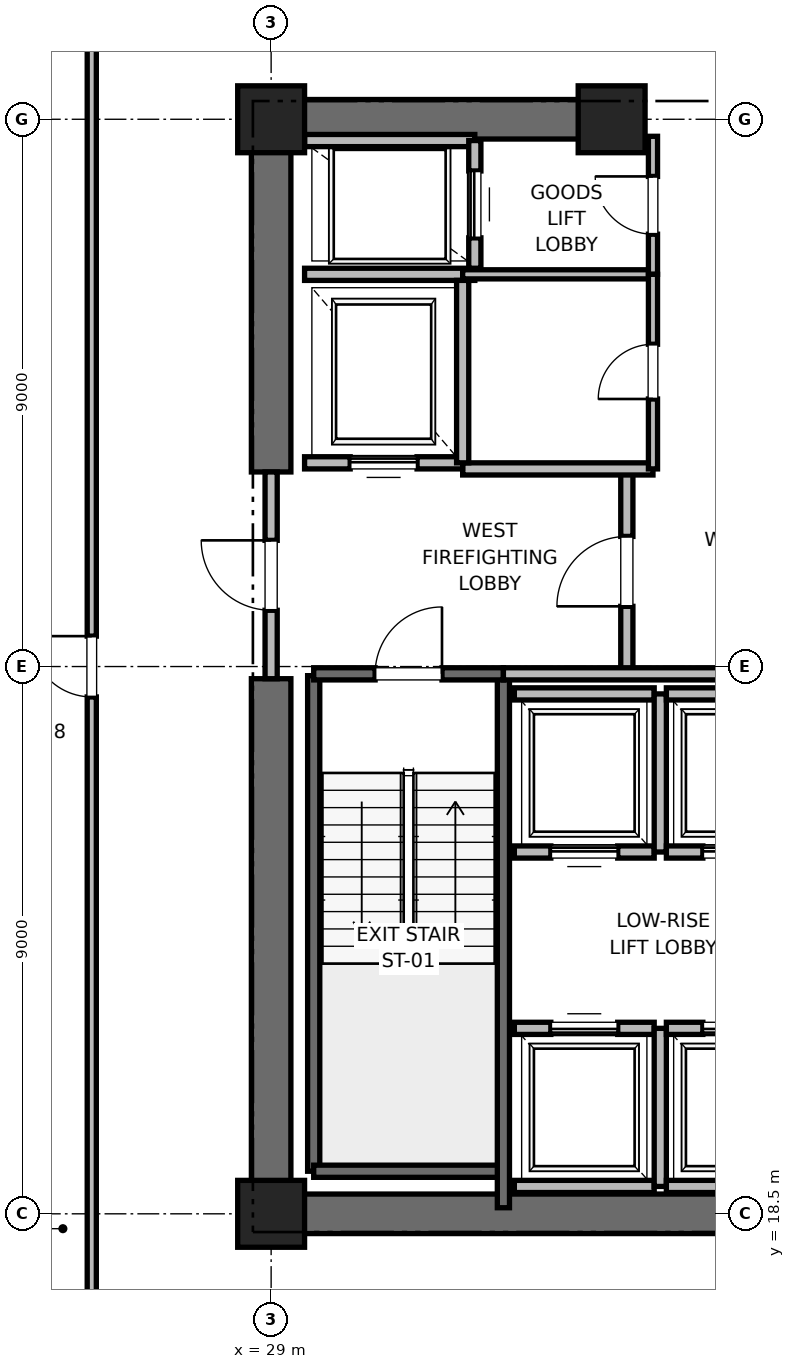
"""IFC4 building model, lengths in metres.
Left out: names, types, materials, properties, quantities, classifications, styles, units other than length and angle.
Written with IfcOpenShell. Run it as: python <this file> out.ifc"""

import sys

from ifc_helpers import new_model, si_unit, direction, frame, frame_2d, origin, origin_2d, place, context, subcontext, project, spatial, rectangle, extrude, element, fill, save


model = new_model("IFC4")
c1 = context("Model", 3, precision=1e-05, world=origin(), true_north=direction((0.0, 1.0)))
c2 = subcontext(c1, "Body", "Model", "MODEL_VIEW")
j1 = project(units=[si_unit("LENGTHUNIT", "METRE"), si_unit("PLANEANGLEUNIT", "RADIAN")], contexts=[c1])
p1 = place(None, origin())
s1 = spatial("IfcSite", under=j1, at=p1, CompositionType="ELEMENT")
p2 = place(p1, origin())
s2 = spatial("IfcBuilding", under=s1, at=p2, CompositionType="ELEMENT")
p3 = place(p2, frame((0.0, 0.0, 35.6)))
s3 = spatial("IfcBuildingStorey", under=s2, at=p3, CompositionType="ELEMENT", Elevation=35.6)
for number, where, z_axis, x_axis in (
    (1, (29.0, 18.5, 0.0), (0.0, 0.0, 1.0), (1.0, 0.0, 0.0)),
    (2, (29.0, 36.5, 0.0), (0.0, 0.0, 1.0), (1.0, 0.0, 0.0)),
    (3, (34.6, 36.5, 0.0), (0.0, 0.0, 1.0), (1.0, 0.0, 0.0)),
):
    element("IfcColumn", number, at=place(p3, frame(where, z_axis=z_axis, x_axis=x_axis)), inside=s3, PredefinedType="PILASTER", context=c2, shape_type="SweptSolid", body=[
        extrude(rectangle(XDim=1.1, YDim=1.1, at=origin_2d()), origin(), (0.0, 0.0, 1.0), 4.0),
    ])
p4 = place(p3, frame((29.0, 18.5, 0.0), z_axis=(0.0, 0.0, 1.0), x_axis=(1.0, 0.0, 0.0)))
e4 = element("IfcWall", 4, at=p4, inside=s3, PredefinedType="SHEAR", context=c2, shape_type="SweptSolid", body=[
    extrude(rectangle(XDim=9.2, YDim=0.65, at=frame_2d((4.6, 0.0))), origin(), (0.0, 0.0, 1.0), 3.76),
])
p5 = place(p3, frame((29.0, 36.5, 0.0), z_axis=(0.0, 0.0, 1.0), x_axis=(1.0, 0.0, 0.0)))
e5 = element("IfcWall", 5, at=p5, inside=s3, PredefinedType="SHEAR", context=c2, shape_type="SweptSolid", body=[
    extrude(rectangle(XDim=5.8, YDim=0.65, at=frame_2d((2.9, 0.0))), origin(), (0.0, 0.0, 1.0), 3.76),
])
p6 = place(p3, frame((29.0, 18.5, 0.0), z_axis=(0.0, 0.0, 1.0), x_axis=(0.0, 1.0, 0.0)))
e6 = element("IfcWall", 6, at=p6, inside=s3, PredefinedType="SHEAR", context=c2, shape_type="SweptSolid", body=[
    extrude(rectangle(XDim=8.8, YDim=0.65, at=frame_2d((4.4, 0.0))), origin(), (0.0, 0.0, 1.0), 3.76),
])
p7 = place(p3, frame((29.0, 30.7, 0.0), z_axis=(0.0, 0.0, 1.0), x_axis=(0.0, 1.0, 0.0)))
e7 = element("IfcWall", 7, at=p7, inside=s3, PredefinedType="SHEAR", context=c2, shape_type="SweptSolid", body=[
    extrude(rectangle(XDim=5.8, YDim=0.65, at=frame_2d((2.9, 0.0))), origin(), (0.0, 0.0, 1.0), 3.76),
])
p8 = place(p3, frame((29.7, 19.2, 0.0), z_axis=(0.0, 0.0, 1.0), x_axis=(0.0, 1.0, 0.0)))
e8 = element("IfcWall", 8, at=p8, inside=s3, PredefinedType="SOLIDWALL", context=c2, shape_type="SweptSolid", body=[
    extrude(rectangle(XDim=8.15, YDim=0.2, at=frame_2d((4.075, 0.0))), origin(), (0.0, 0.0, 1.0), 3.76),
])
p9 = place(p3, frame((29.7, 19.2, 0.0), z_axis=(0.0, 0.0, 1.0), x_axis=(1.0, 0.0, 0.0)))
e9 = element("IfcWall", 9, at=p9, inside=s3, PredefinedType="SOLIDWALL", context=c2, shape_type="SweptSolid", body=[
    extrude(rectangle(XDim=3.12, YDim=0.2, at=frame_2d((1.56, 0.0))), origin(), (0.0, 0.0, 1.0), 3.76),
])
p10 = place(p3, frame((32.82, 18.6, 0.0), z_axis=(0.0, 0.0, 1.0), x_axis=(0.0, 1.0, 0.0)))
e10 = element("IfcWall", 10, at=p10, inside=s3, PredefinedType="SOLIDWALL", context=c2, shape_type="SweptSolid", body=[
    extrude(rectangle(XDim=8.78, YDim=0.2, at=frame_2d((4.39, 0.0))), origin(), (0.0, 0.0, 1.0), 3.76),
])
p11 = place(p3, frame((29.7, 27.38, 0.0), z_axis=(0.0, 0.0, 1.0), x_axis=(1.0, 0.0, 0.0)))
e11 = element("IfcWall", 11, at=p11, inside=s3, PredefinedType="SOLIDWALL", context=c2, shape_type="SweptSolid", body=[
    extrude(rectangle(XDim=3.12, YDim=0.2, at=frame_2d((1.56, 0.0))), origin(), (0.0, 0.0, 1.0), 3.76),
])
p12 = place(p11, frame((1.01, 0.0, 0.0)))
e12 = element("IfcOpeningElement", 12, at=p12, cuts=e11, PredefinedType="OPENING", context=c2, shape_type="SweptSolid", body=[
    extrude(rectangle(XDim=1.1, YDim=2.15, at=frame_2d((0.55, 1.075))), frame((0.0, 0.1, 0.0), z_axis=(0.0, -1.0, 0.0), x_axis=(1.0, 0.0, 0.0)), (0.0, 0.0, 1.0), 0.2),
])
p13 = place(p3, frame((34.85, 27.38, 0.0), z_axis=(0.0, 0.0, 1.0), x_axis=(0.0, 1.0, 0.0)))
e13 = element("IfcWall", 13, at=p13, inside=s3, PredefinedType="PARTITIONING", context=c2, shape_type="SweptSolid", body=[
    extrude(rectangle(XDim=3.37, YDim=0.2, at=frame_2d((1.685, 0.0))), origin(), (0.0, 0.0, 1.0), 3.76),
])
p14 = place(p13, frame((1.11, 0.0, 0.0)))
e14 = element("IfcOpeningElement", 14, at=p14, cuts=e13, PredefinedType="OPENING", context=c2, shape_type="SweptSolid", body=[
    extrude(rectangle(XDim=1.15, YDim=2.2, at=frame_2d((0.575, 1.1))), frame((0.0, 0.1, 0.0), z_axis=(0.0, -1.0, 0.0), x_axis=(1.0, 0.0, 0.0)), (0.0, 0.0, 1.0), 0.2),
])
p15 = place(p3, frame((29.0, 27.3, 0.0), z_axis=(0.0, 0.0, 1.0), x_axis=(0.0, 1.0, 0.0)))
e15 = element("IfcWall", 15, at=p15, inside=s3, PredefinedType="PARTITIONING", context=c2, shape_type="SweptSolid", body=[
    extrude(rectangle(XDim=3.4, YDim=0.2, at=frame_2d((1.7, 0.0))), origin(), (0.0, 0.0, 1.0), 2.54),
])
p16 = place(p15, frame((1.125, 0.0, 0.0)))
e16 = element("IfcOpeningElement", 16, at=p16, cuts=e15, PredefinedType="OPENING", context=c2, shape_type="SweptSolid", body=[
    extrude(rectangle(XDim=1.15, YDim=2.2, at=frame_2d((0.575, 1.1))), frame((0.0, 0.1, 0.0), z_axis=(0.0, -1.0, 0.0), x_axis=(1.0, 0.0, 0.0)), (0.0, 0.0, 1.0), 0.2),
])
p17 = place(p3, frame((32.82, 27.38, 0.0), z_axis=(0.0, 0.0, 1.0), x_axis=(1.0, 0.0, 0.0)))
e17 = element("IfcWall", 17, at=p17, inside=s3, PredefinedType="PARTITIONING", context=c2, shape_type="SweptSolid", body=[
    extrude(rectangle(XDim=5.62, YDim=0.2, at=frame_2d((2.81, 0.0))), origin(), (0.0, 0.0, 1.0), 3.76),
])
p18 = place(p3, frame((32.15, 30.75, 0.0), z_axis=(0.0, 0.0, 1.0), x_axis=(1.0, 0.0, 0.0)))
e18 = element("IfcWall", 18, at=p18, inside=s3, PredefinedType="PARTITIONING", context=c2, shape_type="SweptSolid", body=[
    extrude(rectangle(XDim=3.13, YDim=0.2, at=frame_2d((1.565, 0.0))), origin(), (0.0, 0.0, 1.0), 3.76),
])
p19 = place(p3, frame((29.55, 30.85, 0.0), z_axis=(0.0, 0.0, 1.0), x_axis=(1.0, 0.0, 0.0)))
e19 = element("IfcWall", 19, at=p19, inside=s3, PredefinedType="SOLIDWALL", context=c2, shape_type="SweptSolid", body=[
    extrude(rectangle(XDim=2.6, YDim=0.2, at=frame_2d((1.3, 0.0))), origin(), (0.0, 0.0, 1.0), 2.54),
])
p20 = place(p19, frame((0.75, 0.0, 0.0)))
e20 = element("IfcOpeningElement", 20, at=p20, cuts=e19, PredefinedType="OPENING", context=c2, shape_type="SweptSolid", body=[
    extrude(rectangle(XDim=1.1, YDim=2.2, at=frame_2d((0.55, 1.1))), frame((0.0, 0.1, 0.0), z_axis=(0.0, -1.0, 0.0), x_axis=(1.0, 0.0, 0.0)), (0.0, 0.0, 1.0), 0.2),
])
p21 = place(p3, frame((29.55, 33.95, 0.0), z_axis=(0.0, 0.0, 1.0), x_axis=(1.0, 0.0, 0.0)))
e21 = element("IfcWall", 21, at=p21, inside=s3, PredefinedType="SOLIDWALL", context=c2, shape_type="SweptSolid", body=[
    extrude(rectangle(XDim=2.8, YDim=0.2, at=frame_2d((1.4, 0.0))), origin(), (0.0, 0.0, 1.0), 3.76),
])
p22 = place(p3, frame((32.15, 30.85, 0.0), z_axis=(0.0, 0.0, 1.0), x_axis=(0.0, 1.0, 0.0)))
e22 = element("IfcWall", 22, at=p22, inside=s3, PredefinedType="SOLIDWALL", context=c2, shape_type="SweptSolid", body=[
    extrude(rectangle(XDim=3.0, YDim=0.2, at=frame_2d((1.5, 0.0))), origin(), (0.0, 0.0, 1.0), 3.76),
])
p23 = place(p3, frame((32.35, 36.15, 0.0), z_axis=(0.0, 0.0, 1.0), x_axis=(-1.0, 0.0, 0.0)))
e23 = element("IfcWall", 23, at=p23, inside=s3, PredefinedType="SOLIDWALL", context=c2, shape_type="SweptSolid", body=[
    extrude(rectangle(XDim=2.8, YDim=0.2, at=frame_2d((1.4, 0.0))), origin(), (0.0, 0.0, 1.0), 2.889),
])
p24 = place(p3, frame((32.35, 34.05, 0.0), z_axis=(0.0, 0.0, 1.0), x_axis=(0.0, 1.0, 0.0)))
e24 = element("IfcWall", 24, at=p24, inside=s3, PredefinedType="SOLIDWALL", context=c2, shape_type="SweptSolid", body=[
    extrude(rectangle(XDim=2.1, YDim=0.2, at=frame_2d((1.05, 0.0))), origin(), (0.0, 0.0, 1.0), 3.76),
])
p25 = place(p24, frame((0.5, 0.0, 0.0)))
e25 = element("IfcOpeningElement", 25, at=p25, cuts=e24, PredefinedType="OPENING", context=c2, shape_type="SweptSolid", body=[
    extrude(rectangle(XDim=1.1, YDim=2.2, at=frame_2d((0.55, 1.1))), frame((0.0, 0.1, 0.0), z_axis=(0.0, -1.0, 0.0), x_axis=(1.0, 0.0, 0.0)), (0.0, 0.0, 1.0), 0.2),
])
p26 = place(p3, frame((33.0, 18.95, 0.0), z_axis=(0.0, 0.0, 1.0), x_axis=(1.0, 0.0, 0.0)))
e26 = element("IfcWall", 26, at=p26, inside=s3, PredefinedType="SOLIDWALL", context=c2, shape_type="SweptSolid", body=[
    extrude(rectangle(XDim=2.3, YDim=0.2, at=frame_2d((1.15, 0.0))), origin(), (0.0, 0.0, 1.0), 3.76),
])
p27 = place(p3, frame((35.3, 21.55, 0.0), z_axis=(0.0, 0.0, 1.0), x_axis=(-1.0, 0.0, 0.0)))
e27 = element("IfcWall", 27, at=p27, inside=s3, PredefinedType="SOLIDWALL", context=c2, shape_type="SweptSolid", body=[
    extrude(rectangle(XDim=2.3, YDim=0.2, at=frame_2d((1.15, 0.0))), origin(), (0.0, 0.0, 1.0), 3.76),
])
p28 = place(p27, frame((0.6, 0.0, 0.0)))
e28 = element("IfcOpeningElement", 28, at=p28, cuts=e27, PredefinedType="OPENING", context=c2, shape_type="SweptSolid", body=[
    extrude(rectangle(XDim=1.1, YDim=2.2, at=frame_2d((0.55, 1.1))), frame((0.0, 0.1, 0.0), z_axis=(0.0, -1.0, 0.0), x_axis=(1.0, 0.0, 0.0)), (0.0, 0.0, 1.0), 0.2),
])
p29 = place(p3, frame((35.4, 18.95, 0.0), z_axis=(0.0, 0.0, 1.0), x_axis=(0.0, 1.0, 0.0)))
e29 = element("IfcWall", 29, at=p29, inside=s3, PredefinedType="SOLIDWALL", context=c2, shape_type="SweptSolid", body=[
    extrude(rectangle(XDim=2.6, YDim=0.2, at=frame_2d((1.3, 0.0))), origin(), (0.0, 0.0, 1.0), 3.76),
])
p30 = place(p3, frame((35.5, 18.95, 0.0), z_axis=(0.0, 0.0, 1.0), x_axis=(1.0, 0.0, 0.0)))
e30 = element("IfcWall", 30, at=p30, inside=s3, PredefinedType="SOLIDWALL", context=c2, shape_type="SweptSolid", body=[
    extrude(rectangle(XDim=2.3, YDim=0.2, at=frame_2d((1.15, 0.0))), origin(), (0.0, 0.0, 1.0), 2.54),
])
p31 = place(p3, frame((37.8, 21.55, 0.0), z_axis=(0.0, 0.0, 1.0), x_axis=(-1.0, 0.0, 0.0)))
e31 = element("IfcWall", 31, at=p31, inside=s3, PredefinedType="SOLIDWALL", context=c2, shape_type="SweptSolid", body=[
    extrude(rectangle(XDim=2.3, YDim=0.2, at=frame_2d((1.15, 0.0))), origin(), (0.0, 0.0, 1.0), 3.76),
])
p32 = place(p31, frame((0.6, 0.0, 0.0)))
e32 = element("IfcOpeningElement", 32, at=p32, cuts=e31, PredefinedType="OPENING", context=c2, shape_type="SweptSolid", body=[
    extrude(rectangle(XDim=1.1, YDim=2.2, at=frame_2d((0.55, 1.1))), frame((0.0, 0.1, 0.0), z_axis=(0.0, -1.0, 0.0), x_axis=(1.0, 0.0, 0.0)), (0.0, 0.0, 1.0), 0.2),
])
p33 = place(p3, frame((33.0, 24.45, 0.0), z_axis=(0.0, 0.0, 1.0), x_axis=(1.0, 0.0, 0.0)))
e33 = element("IfcWall", 33, at=p33, inside=s3, PredefinedType="SOLIDWALL", context=c2, shape_type="SweptSolid", body=[
    extrude(rectangle(XDim=2.3, YDim=0.2, at=frame_2d((1.15, 0.0))), origin(), (0.0, 0.0, 1.0), 3.76),
])
p34 = place(p33, frame((0.6, 0.0, 0.0)))
e34 = element("IfcOpeningElement", 34, at=p34, cuts=e33, PredefinedType="OPENING", context=c2, shape_type="SweptSolid", body=[
    extrude(rectangle(XDim=1.1, YDim=2.2, at=frame_2d((0.55, 1.1))), frame((0.0, 0.1, 0.0), z_axis=(0.0, -1.0, 0.0), x_axis=(1.0, 0.0, 0.0)), (0.0, 0.0, 1.0), 0.2),
])
p35 = place(p3, frame((35.3, 27.05, 0.0), z_axis=(0.0, 0.0, 1.0), x_axis=(-1.0, 0.0, 0.0)))
e35 = element("IfcWall", 35, at=p35, inside=s3, PredefinedType="SOLIDWALL", context=c2, shape_type="SweptSolid", body=[
    extrude(rectangle(XDim=2.3, YDim=0.2, at=frame_2d((1.15, 0.0))), origin(), (0.0, 0.0, 1.0), 3.76),
])
p36 = place(p3, frame((35.4, 24.45, 0.0), z_axis=(0.0, 0.0, 1.0), x_axis=(0.0, 1.0, 0.0)))
e36 = element("IfcWall", 36, at=p36, inside=s3, PredefinedType="SOLIDWALL", context=c2, shape_type="SweptSolid", body=[
    extrude(rectangle(XDim=2.6, YDim=0.2, at=frame_2d((1.3, 0.0))), origin(), (0.0, 0.0, 1.0), 3.76),
])
p37 = place(p3, frame((35.5, 24.45, 0.0), z_axis=(0.0, 0.0, 1.0), x_axis=(1.0, 0.0, 0.0)))
e37 = element("IfcWall", 37, at=p37, inside=s3, PredefinedType="SOLIDWALL", context=c2, shape_type="SweptSolid", body=[
    extrude(rectangle(XDim=2.3, YDim=0.2, at=frame_2d((1.15, 0.0))), origin(), (0.0, 0.0, 1.0), 3.76),
])
p38 = place(p37, frame((0.6, 0.0, 0.0)))
e38 = element("IfcOpeningElement", 38, at=p38, cuts=e37, PredefinedType="OPENING", context=c2, shape_type="SweptSolid", body=[
    extrude(rectangle(XDim=1.1, YDim=2.2, at=frame_2d((0.55, 1.1))), frame((0.0, 0.1, 0.0), z_axis=(0.0, -1.0, 0.0), x_axis=(1.0, 0.0, 0.0)), (0.0, 0.0, 1.0), 0.2),
])
p39 = place(p3, frame((37.8, 27.05, 0.0), z_axis=(0.0, 0.0, 1.0), x_axis=(-1.0, 0.0, 0.0)))
e39 = element("IfcWall", 39, at=p39, inside=s3, PredefinedType="SOLIDWALL", context=c2, shape_type="SweptSolid", body=[
    extrude(rectangle(XDim=2.3, YDim=0.2, at=frame_2d((1.15, 0.0))), origin(), (0.0, 0.0, 1.0), 3.76),
])
p40 = place(p3, frame((32.15, 33.95, 0.0), z_axis=(0.0, 0.0, 1.0), x_axis=(1.0, 0.0, 0.0)))
e40 = element("IfcWall", 40, at=p40, inside=s3, PredefinedType="PARTITIONING", context=c2, shape_type="SweptSolid", body=[
    extrude(rectangle(XDim=3.13, YDim=0.15, at=frame_2d((1.565, 0.0))), origin(), (0.0, 0.0, 1.0), 2.85),
])
p41 = place(p3, frame((35.28, 33.95, 0.0), z_axis=(0.0, 0.0, 1.0), x_axis=(0.0, 1.0, 0.0)))
e41 = element("IfcWall", 41, at=p41, inside=s3, PredefinedType="PARTITIONING", context=c2, shape_type="SweptSolid", body=[
    extrude(rectangle(XDim=2.27, YDim=0.15, at=frame_2d((1.135, 0.0))), origin(), (0.0, 0.0, 1.0), 2.54),
])
p42 = place(p41, frame((0.66, 0.0, 0.0)))
e42 = element("IfcOpeningElement", 42, at=p42, cuts=e41, PredefinedType="OPENING", context=c2, shape_type="SweptSolid", body=[
    extrude(rectangle(XDim=0.95, YDim=2.15, at=frame_2d((0.475, 1.075))), frame((0.0, 0.075, 0.0), z_axis=(0.0, -1.0, 0.0), x_axis=(1.0, 0.0, 0.0)), (0.0, 0.0, 1.0), 0.15),
])
p43 = place(p3, frame((35.28, 30.75, 0.0), z_axis=(0.0, 0.0, 1.0), x_axis=(0.0, 1.0, 0.0)))
e43 = element("IfcWall", 43, at=p43, inside=s3, PredefinedType="PARTITIONING", context=c2, shape_type="SweptSolid", body=[
    extrude(rectangle(XDim=3.2, YDim=0.15, at=frame_2d((1.6, 0.0))), origin(), (0.0, 0.0, 1.0), 2.85),
])
p44 = place(p43, frame((1.15, 0.0, 0.0)))
e44 = element("IfcOpeningElement", 44, at=p44, cuts=e43, PredefinedType="OPENING", context=c2, shape_type="SweptSolid", body=[
    extrude(rectangle(XDim=0.9, YDim=2.1, at=frame_2d((0.45, 1.05))), frame((0.0, 0.075, 0.0), z_axis=(0.0, -1.0, 0.0), x_axis=(1.0, 0.0, 0.0)), (0.0, 0.0, 1.0), 0.15),
])
p45 = place(p3, frame((26.05, 9.511, 0.0), z_axis=(0.0, 0.0, 1.0), x_axis=(0.0, 1.0, 0.0)))
e45 = element("IfcWall", 45, at=p45, inside=s3, PredefinedType="PARTITIONING", context=c2, shape_type="SweptSolid", body=[
    extrude(rectangle(XDim=35.979, YDim=0.15, at=frame_2d((17.989, 0.0))), origin(), (0.0, 0.0, 1.0), 2.85),
])
p46 = place(p45, frame((17.489, 0.0, 0.0)))
e46 = element("IfcOpeningElement", 46, at=p46, cuts=e45, PredefinedType="OPENING", context=c2, shape_type="SweptSolid", body=[
    extrude(rectangle(XDim=1.0, YDim=2.15, at=frame_2d((0.5, 1.075))), frame((0.0, 0.075, 0.0), z_axis=(0.0, -1.0, 0.0), x_axis=(1.0, 0.0, 0.0)), (0.0, 0.0, 1.0), 0.15),
])
p47 = place(p12, origin())
e47 = element("IfcDoor", 47, at=p47, inside=s3, OperationType="SINGLE_SWING_RIGHT", PredefinedType="DOOR", context=c2, shape_type="SweptSolid", body=[
    extrude(rectangle(XDim=1.1, YDim=2.15, at=frame_2d((0.55, 1.075))), frame((0.0, 0.025, 0.0), z_axis=(0.0, -1.0, 0.0), x_axis=(1.0, 0.0, 0.0)), (0.0, 0.0, 1.0), 0.05),
])
fill(e12, e47)
p48 = place(p14, origin())
e48 = element("IfcDoor", 48, at=p48, inside=s3, OperationType="SINGLE_SWING_LEFT", PredefinedType="DOOR", context=c2, shape_type="SweptSolid", body=[
    extrude(rectangle(XDim=1.15, YDim=2.2, at=frame_2d((0.575, 1.1))), frame((0.0, 0.025, 0.0), z_axis=(0.0, -1.0, 0.0), x_axis=(1.0, 0.0, 0.0)), (0.0, 0.0, 1.0), 0.05),
])
fill(e14, e48)
p49 = place(p16, origin())
e49 = element("IfcDoor", 49, at=p49, inside=s3, OperationType="SINGLE_SWING_RIGHT", PredefinedType="DOOR", context=c2, shape_type="SweptSolid", body=[
    extrude(rectangle(XDim=1.15, YDim=2.2, at=frame_2d((0.575, 1.1))), frame((0.0, 0.025, 0.0), z_axis=(0.0, -1.0, 0.0), x_axis=(1.0, 0.0, 0.0)), (0.0, 0.0, 1.0), 0.05),
])
fill(e16, e49)
p50 = place(p20, origin())
e50 = element("IfcDoor", 50, at=p50, inside=s3, OperationType="SLIDING_TO_RIGHT", PredefinedType="DOOR", context=c2, shape_type="SweptSolid", body=[
    extrude(rectangle(XDim=1.1, YDim=2.2, at=frame_2d((0.55, 1.1))), frame((0.0, 0.025, 0.0), z_axis=(0.0, -1.0, 0.0), x_axis=(1.0, 0.0, 0.0)), (0.0, 0.0, 1.0), 0.05),
])
fill(e20, e50)
p51 = place(p25, origin())
e51 = element("IfcDoor", 51, at=p51, inside=s3, OperationType="SLIDING_TO_RIGHT", PredefinedType="DOOR", context=c2, shape_type="SweptSolid", body=[
    extrude(rectangle(XDim=1.1, YDim=2.2, at=frame_2d((0.55, 1.1))), frame((0.0, 0.025, 0.0), z_axis=(0.0, -1.0, 0.0), x_axis=(1.0, 0.0, 0.0)), (0.0, 0.0, 1.0), 0.05),
])
fill(e25, e51)
p52 = place(p28, origin())
e52 = element("IfcDoor", 52, at=p52, inside=s3, OperationType="SLIDING_TO_RIGHT", PredefinedType="DOOR", context=c2, shape_type="SweptSolid", body=[
    extrude(rectangle(XDim=1.1, YDim=2.2, at=frame_2d((0.55, 1.1))), frame((0.0, 0.025, 0.0), z_axis=(0.0, -1.0, 0.0), x_axis=(1.0, 0.0, 0.0)), (0.0, 0.0, 1.0), 0.05),
])
fill(e28, e52)
p53 = place(p32, origin())
e53 = element("IfcDoor", 53, at=p53, inside=s3, OperationType="SLIDING_TO_RIGHT", PredefinedType="DOOR", context=c2, shape_type="SweptSolid", body=[
    extrude(rectangle(XDim=1.1, YDim=2.2, at=frame_2d((0.55, 1.1))), frame((0.0, 0.025, 0.0), z_axis=(0.0, -1.0, 0.0), x_axis=(1.0, 0.0, 0.0)), (0.0, 0.0, 1.0), 0.05),
])
fill(e32, e53)
p54 = place(p34, origin())
e54 = element("IfcDoor", 54, at=p54, inside=s3, OperationType="SLIDING_TO_RIGHT", PredefinedType="DOOR", context=c2, shape_type="SweptSolid", body=[
    extrude(rectangle(XDim=1.1, YDim=2.2, at=frame_2d((0.55, 1.1))), frame((0.0, 0.025, 0.0), z_axis=(0.0, -1.0, 0.0), x_axis=(1.0, 0.0, 0.0)), (0.0, 0.0, 1.0), 0.05),
])
fill(e34, e54)
p55 = place(p38, origin())
e55 = element("IfcDoor", 55, at=p55, inside=s3, OperationType="SLIDING_TO_RIGHT", PredefinedType="DOOR", context=c2, shape_type="SweptSolid", body=[
    extrude(rectangle(XDim=1.1, YDim=2.2, at=frame_2d((0.55, 1.1))), frame((0.0, 0.025, 0.0), z_axis=(0.0, -1.0, 0.0), x_axis=(1.0, 0.0, 0.0)), (0.0, 0.0, 1.0), 0.05),
])
fill(e38, e55)
p56 = place(p42, origin())
e56 = element("IfcDoor", 56, at=p56, inside=s3, OperationType="SINGLE_SWING_RIGHT", PredefinedType="DOOR", context=c2, shape_type="SweptSolid", body=[
    extrude(rectangle(XDim=0.95, YDim=2.15, at=frame_2d((0.475, 1.075))), frame((0.0, 0.025, 0.0), z_axis=(0.0, -1.0, 0.0), x_axis=(1.0, 0.0, 0.0)), (0.0, 0.0, 1.0), 0.05),
])
fill(e42, e56)
p57 = place(p44, origin())
e57 = element("IfcDoor", 57, at=p57, inside=s3, OperationType="SINGLE_SWING_LEFT", PredefinedType="DOOR", context=c2, shape_type="SweptSolid", body=[
    extrude(rectangle(XDim=0.9, YDim=2.1, at=frame_2d((0.45, 1.05))), frame((0.0, 0.025, 0.0), z_axis=(0.0, -1.0, 0.0), x_axis=(1.0, 0.0, 0.0)), (0.0, 0.0, 1.0), 0.05),
])
fill(e44, e57)
p58 = place(p46, origin())
e58 = element("IfcDoor", 58, at=p58, inside=s3, OperationType="SINGLE_SWING_RIGHT", PredefinedType="DOOR", context=c2, shape_type="SweptSolid", body=[
    extrude(rectangle(XDim=1.0, YDim=2.15, at=frame_2d((0.5, 1.075))), frame((0.0, 0.025, 0.0), z_axis=(0.0, -1.0, 0.0), x_axis=(1.0, 0.0, 0.0)), (0.0, 0.0, 1.0), 0.05),
])
fill(e46, e58)
save(model, sys.argv[1])
